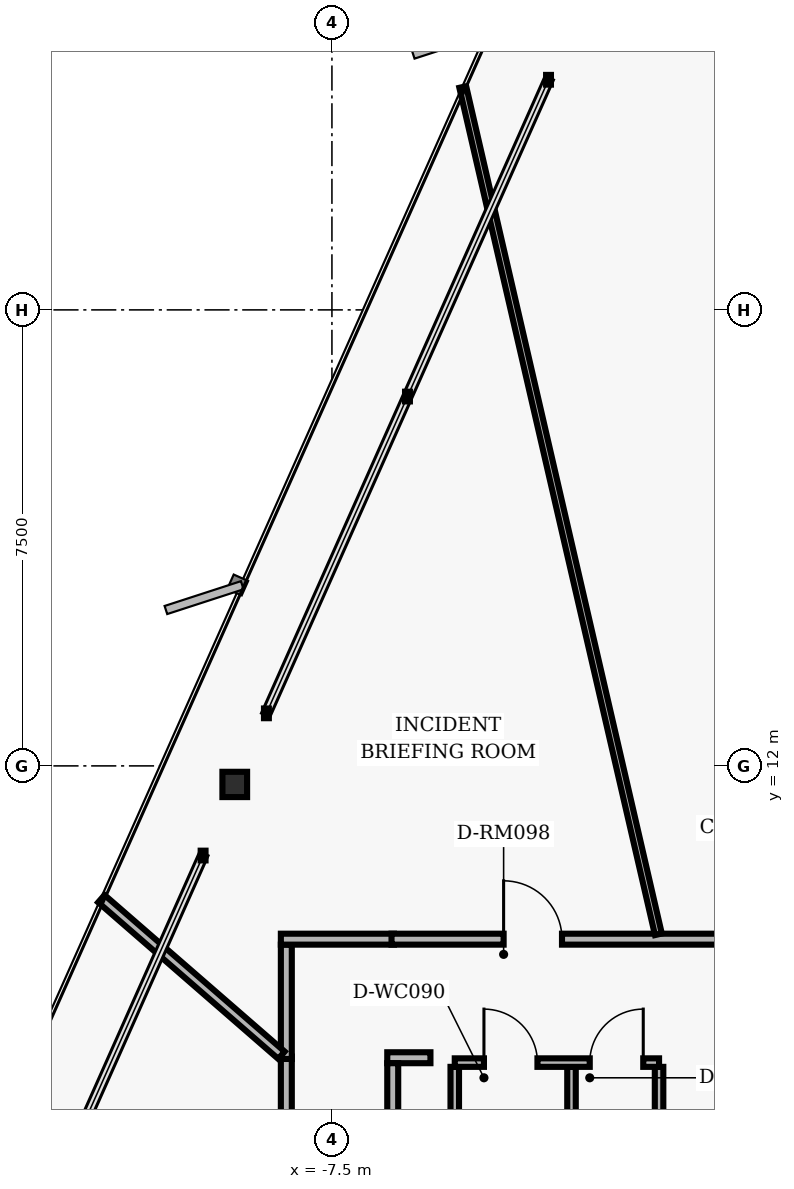
"""IFC4 building model, lengths in metres.
Left out: names, types, materials, properties, quantities, classifications, styles, units other than length and angle.
Written with IfcOpenShell. Run it as: python <this file> out.ifc"""

import sys

from ifc_helpers import new_model, si_unit, direction, frame, frame_2d, origin, origin_2d, place, context, subcontext, project, spatial, rectangle, i_section, extrude, element, fill, save


model = new_model("IFC4")
c1 = context("Model", 3, precision=1e-05, world=origin(), true_north=direction((0.0, 1.0)))
c2 = subcontext(c1, "Body", "Model", "MODEL_VIEW")
j1 = project(units=[si_unit("LENGTHUNIT", "METRE"), si_unit("PLANEANGLEUNIT", "RADIAN")], contexts=[c1])
p1 = place(None, origin())
s1 = spatial("IfcSite", under=j1, at=p1, CompositionType="ELEMENT")
p2 = place(p1, origin())
s2 = spatial("IfcBuilding", under=s1, at=p2, CompositionType="ELEMENT")
p3 = place(p2, frame((0.0, 0.0, 116.8)))
s3 = spatial("IfcBuildingStorey", under=s2, at=p3, CompositionType="ELEMENT", Elevation=116.8)
p4 = place(p3, frame((-9.098, 11.695, 0.0), z_axis=(0.0, 0.0, 1.0), x_axis=(1.0, 0.0, 0.0)))
e1 = element("IfcColumn", 1, at=p4, inside=s3, PredefinedType="COLUMN", context=c2, shape_type="SweptSolid", body=[
    extrude(i_section(OverallWidth=0.406, OverallDepth=0.416, WebThickness=0.03, FlangeThickness=0.048, FilletRadius=0.02, at=origin_2d()), origin(), (0.0, 0.0, 1.0), 3.04),
])
for number, where, z_axis, x_axis in (
    (2, (-5.48, 4.95, 0.0), (0.0, 0.0, 1.0), (0.0, 1.0, 0.0)),
    (3, (-3.56, 4.95, 0.0), (0.0, 0.0, 1.0), (0.0, 1.0, 0.0)),
    (4, (-2.12, 4.95, 0.0), (0.0, 0.0, 1.0), (0.0, 1.0, 0.0)),
):
    element("IfcWall", number, at=place(p3, frame(where, z_axis=z_axis, x_axis=x_axis)), inside=s3, PredefinedType="PARTITIONING", context=c2, shape_type="SweptSolid", body=[
        extrude(rectangle(XDim=2.1, YDim=0.14, at=frame_2d((1.05, 0.0))), origin(), (0.0, 0.0, 1.0), 2.763),
    ])
p5 = place(p3, frame((-5.48, 7.12, 0.0), z_axis=(0.0, 0.0, 1.0), x_axis=(1.0, 0.0, 0.0)))
e5 = element("IfcWall", 5, at=p5, inside=s3, PredefinedType="PARTITIONING", context=c2, shape_type="SweptSolid", body=[
    extrude(rectangle(XDim=3.36, YDim=0.14, at=frame_2d((1.68, 0.0))), origin(), (0.0, 0.0, 1.0), 2.763),
])
p6 = place(p5, frame((0.48, 0.0, 0.0)))
e6 = element("IfcOpeningElement", 6, at=p6, cuts=e5, PredefinedType="OPENING", context=c2, shape_type="SweptSolid", body=[
    extrude(rectangle(XDim=0.88, YDim=2.02, at=frame_2d((0.44, 1.01))), frame((0.0, 0.08, 0.0), z_axis=(0.0, -1.0, 0.0), x_axis=(1.0, 0.0, 0.0)), (0.0, 0.0, 1.0), 0.16),
])
p7 = place(p5, frame((2.22, 0.0, 0.0)))
e7 = element("IfcOpeningElement", 7, at=p7, cuts=e5, PredefinedType="OPENING", context=c2, shape_type="SweptSolid", body=[
    extrude(rectangle(XDim=0.88, YDim=2.02, at=frame_2d((0.44, 1.01))), frame((0.0, 0.08, 0.0), z_axis=(0.0, -1.0, 0.0), x_axis=(1.0, 0.0, 0.0)), (0.0, 0.0, 1.0), 0.16),
])
p8 = place(p3, frame((-8.25, -7.22, 0.0), z_axis=(0.0, 0.0, 1.0), x_axis=(0.0, 1.0, 0.0)))
e8 = element("IfcWall", 8, at=p8, inside=s3, PredefinedType="PARTITIONING", context=c2, shape_type="SweptSolid", body=[
    extrude(rectangle(XDim=14.44, YDim=0.18, at=frame_2d((7.22, 0.0))), origin(), (0.0, 0.0, 1.0), 2.33),
])
p9 = place(p8, frame((6.665, 0.0, 0.0)))
e9 = element("IfcOpeningElement", 9, at=p9, cuts=e8, PredefinedType="OPENING", context=c2, shape_type="SweptSolid", body=[
    extrude(rectangle(XDim=0.96, YDim=2.02, at=frame_2d((0.48, 1.01))), frame((0.0, 0.1, 0.0), z_axis=(0.0, -1.0, 0.0), x_axis=(1.0, 0.0, 0.0)), (0.0, 0.0, 1.0), 0.2),
])
p10 = place(p8, frame((2.525, 0.0, 0.0)))
e10 = element("IfcOpeningElement", 10, at=p10, cuts=e8, PredefinedType="OPENING", context=c2, shape_type="SweptSolid", body=[
    extrude(rectangle(XDim=0.96, YDim=2.02, at=frame_2d((0.48, 1.01))), frame((0.0, 0.1, 0.0), z_axis=(0.0, -1.0, 0.0), x_axis=(1.0, 0.0, 0.0)), (0.0, 0.0, 1.0), 0.2),
])
p11 = place(p8, frame((10.88, 0.0, 0.0)))
e11 = element("IfcOpeningElement", 11, at=p11, cuts=e8, PredefinedType="OPENING", context=c2, shape_type="SweptSolid", body=[
    extrude(rectangle(XDim=0.96, YDim=2.02, at=frame_2d((0.48, 1.01))), frame((0.0, 0.1, 0.0), z_axis=(0.0, -1.0, 0.0), x_axis=(1.0, 0.0, 0.0)), (0.0, 0.0, 1.0), 0.2),
])
p12 = place(p3, frame((-8.25, 7.18, 0.0), z_axis=(0.0, 0.0, 1.0), x_axis=(0.0, 1.0, 0.0)))
e12 = element("IfcWall", 12, at=p12, inside=s3, PredefinedType="PARTITIONING", context=c2, shape_type="SweptSolid", body=[
    extrude(rectangle(XDim=1.88, YDim=0.18, at=frame_2d((0.94, 0.0))), origin(), (0.0, 0.0, 1.0), 2.763),
])
p13 = place(p3, frame((-8.34, 9.15, 0.0), z_axis=(0.0, 0.0, 1.0), x_axis=(1.0, 0.0, 0.0)))
e13 = element("IfcWall", 13, at=p13, inside=s3, PredefinedType="PARTITIONING", context=c2, shape_type="SweptSolid", body=[
    extrude(rectangle(XDim=1.86, YDim=0.18, at=frame_2d((0.93, 0.0))), origin(), (0.0, 0.0, 1.0), 2.763),
])
p14 = place(p3, frame((-6.52, 9.15, 0.0), z_axis=(0.0, 0.0, 1.0), x_axis=(1.0, 0.0, 0.0)))
e14 = element("IfcWall", 14, at=p14, inside=s3, PredefinedType="PARTITIONING", context=c2, shape_type="SweptSolid", body=[
    extrude(rectangle(XDim=16.82, YDim=0.18, at=frame_2d((8.41, 0.0))), origin(), (0.0, 0.0, 1.0), 2.763),
])
p15 = place(p14, frame((13.022, 0.0, 0.0)))
e15 = element("IfcOpeningElement", 15, at=p15, cuts=e14, PredefinedType="OPENING", context=c2, shape_type="SweptSolid", body=[
    extrude(rectangle(XDim=0.96, YDim=2.02, at=frame_2d((0.48, 1.01))), frame((0.0, 0.1, 0.0), z_axis=(0.0, -1.0, 0.0), x_axis=(1.0, 0.0, 0.0)), (0.0, 0.0, 1.0), 0.2),
])
p16 = place(p14, frame((6.934, 0.0, 0.0)))
e16 = element("IfcOpeningElement", 16, at=p16, cuts=e14, PredefinedType="OPENING", context=c2, shape_type="SweptSolid", body=[
    extrude(rectangle(XDim=0.96, YDim=2.02, at=frame_2d((0.48, 1.01))), frame((0.0, 0.1, 0.0), z_axis=(0.0, -1.0, 0.0), x_axis=(1.0, 0.0, 0.0)), (0.0, 0.0, 1.0), 0.2),
])
p17 = place(p14, frame((1.844, 0.0, 0.0)))
e17 = element("IfcOpeningElement", 17, at=p17, cuts=e14, PredefinedType="OPENING", context=c2, shape_type="SweptSolid", body=[
    extrude(rectangle(XDim=0.96, YDim=2.02, at=frame_2d((0.48, 1.01))), frame((0.0, 0.1, 0.0), z_axis=(0.0, -1.0, 0.0), x_axis=(1.0, 0.0, 0.0)), (0.0, 0.0, 1.0), 0.2),
])
p18 = place(p3, frame((-5.88, 7.2, 0.0), z_axis=(0.0, 0.0, 1.0), x_axis=(-1.0, 0.0, 0.0)))
e18 = element("IfcWall", 18, at=p18, inside=s3, PredefinedType="PARTITIONING", context=c2, shape_type="SweptSolid", body=[
    extrude(rectangle(XDim=0.71, YDim=0.18, at=frame_2d((0.355, 0.0))), origin(), (0.0, 0.0, 1.0), 2.763),
])
p19 = place(p3, frame((-6.5, 7.11, 0.0), z_axis=(0.0, 0.0, 1.0), x_axis=(0.0, -1.0, 0.0)))
e19 = element("IfcWall", 19, at=p19, inside=s3, PredefinedType="PARTITIONING", context=c2, shape_type="SweptSolid", body=[
    extrude(rectangle(XDim=2.058, YDim=0.18, at=frame_2d((1.029, 0.0))), origin(), (0.0, 0.0, 1.0), 2.763),
])
p20 = place(p3, frame((-2.131, 9.23, 0.0), z_axis=(0.0, 0.0, 1.0), x_axis=(-0.224960484743, 0.974367887558, 0.0)))
e20 = element("IfcWall", 20, at=p20, inside=s3, PredefinedType="MOVABLE", context=c2, shape_type="SweptSolid", body=[
    extrude(rectangle(XDim=14.303, YDim=0.115, at=frame_2d((7.151, 0.0))), origin(), (0.0, 0.0, 1.0), 2.763),
])
p21 = place(p3, frame((-8.33, 7.241, 0.0), z_axis=(0.0, 0.0, 1.0), x_axis=(-0.754715330954, 0.656052413472, 0.0)))
e21 = element("IfcWall", 21, at=p21, inside=s3, PredefinedType="PARTITIONING", context=c2, shape_type="SweptSolid", body=[
    extrude(rectangle(XDim=3.925, YDim=0.16, at=frame_2d((1.962, 0.0))), origin(), (0.0, 0.0, 1.0), 2.763),
])
p22 = place(p6, origin())
e22 = element("IfcDoor", 22, at=p22, inside=s3, OperationType="SINGLE_SWING_LEFT", PredefinedType="DOOR", context=c2, shape_type="SweptSolid", body=[
    extrude(rectangle(XDim=0.88, YDim=2.02, at=frame_2d((0.44, 1.01))), frame((0.0, 0.025, 0.0), z_axis=(0.0, -1.0, 0.0), x_axis=(1.0, 0.0, 0.0)), (0.0, 0.0, 1.0), 0.05),
])
fill(e6, e22)
p23 = place(p7, origin())
e23 = element("IfcDoor", 23, at=p23, inside=s3, OperationType="SINGLE_SWING_RIGHT", PredefinedType="DOOR", context=c2, shape_type="SweptSolid", body=[
    extrude(rectangle(XDim=0.88, YDim=2.02, at=frame_2d((0.44, 1.01))), frame((0.0, 0.025, 0.0), z_axis=(0.0, -1.0, 0.0), x_axis=(1.0, 0.0, 0.0)), (0.0, 0.0, 1.0), 0.05),
])
fill(e7, e23)
p24 = place(p17, origin())
e24 = element("IfcDoor", 24, at=p24, inside=s3, OperationType="SINGLE_SWING_LEFT", PredefinedType="DOOR", context=c2, shape_type="SweptSolid", body=[
    extrude(rectangle(XDim=0.96, YDim=2.02, at=frame_2d((0.48, 1.01))), frame((0.0, 0.025, 0.0), z_axis=(0.0, -1.0, 0.0), x_axis=(1.0, 0.0, 0.0)), (0.0, 0.0, 1.0), 0.05),
])
fill(e17, e24)
save(model, sys.argv[1])
